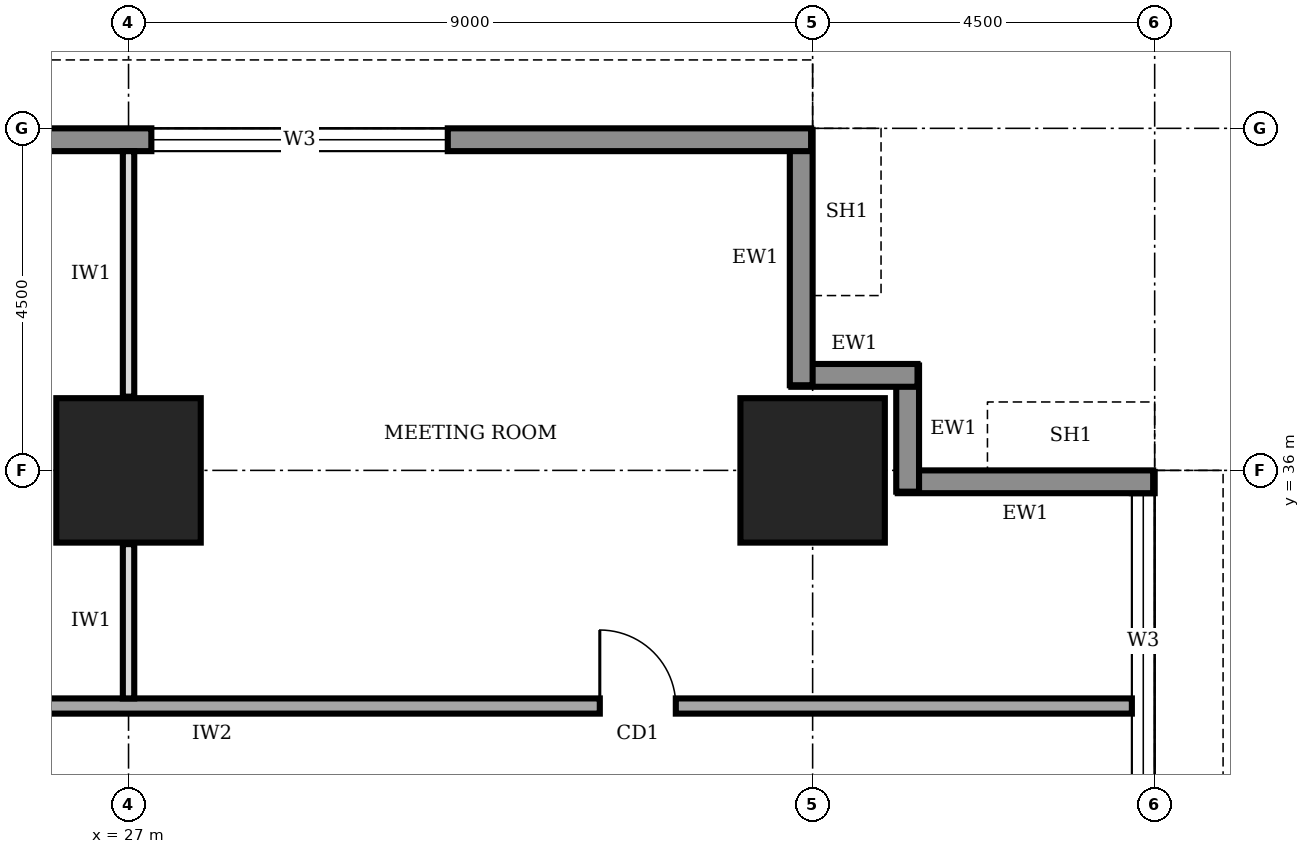
"""IFC4 building model, lengths in metres.
Left out: names, types, materials, properties, quantities, classifications, styles, units other than length and angle.
Written with IfcOpenShell. Run it as: python <this file> out.ifc"""

import sys

from ifc_helpers import new_model, si_unit, direction, frame, frame_2d, origin, origin_2d, place, context, subcontext, project, spatial, rectangle, extrude, element, fill, save


model = new_model("IFC4")
c1 = context("Model", 3, precision=1e-05, world=origin(), true_north=direction((0.0, 1.0)))
c2 = subcontext(c1, "Body", "Model", "MODEL_VIEW")
j1 = project(units=[si_unit("LENGTHUNIT", "METRE"), si_unit("PLANEANGLEUNIT", "RADIAN")], contexts=[c1])
p1 = place(None, origin())
s1 = spatial("IfcSite", under=j1, at=p1, CompositionType="ELEMENT")
p2 = place(p1, origin())
s2 = spatial("IfcBuilding", under=s1, at=p2, CompositionType="ELEMENT")
p3 = place(p2, frame((0.0, 0.0, 85.0)))
s3 = spatial("IfcBuildingStorey", under=s2, at=p3, CompositionType="ELEMENT", Elevation=85.0)
for number, where, z_axis, x_axis in (
    (1, (27.0, 36.0, 0.0), (0.0, 0.0, 1.0), (1.0, 0.0, 0.0)),
    (2, (36.0, 36.0, 0.0), (0.0, 0.0, 1.0), (1.0, 0.0, 0.0)),
):
    element("IfcColumn", number, at=place(p3, frame(where, z_axis=z_axis, x_axis=x_axis)), inside=s3, PredefinedType="COLUMN", context=c2, shape_type="SweptSolid", body=[
        extrude(rectangle(XDim=1.9, YDim=1.9, at=origin_2d()), origin(), (0.0, 0.0, 1.0), 4.0),
    ])
p4 = place(p3, frame((40.35, 4.52, 0.0), z_axis=(0.0, 0.0, 1.0), x_axis=(0.0, 1.0, 0.0)))
e3 = element("IfcWall", 3, at=p4, inside=s3, PredefinedType="STANDARD", context=c2, shape_type="SweptSolid", body=[
    extrude(rectangle(XDim=31.46, YDim=0.3, at=frame_2d((15.73, 0.0))), origin(), (0.0, 0.0, 1.0), 3.75),
])
p5 = place(p4, frame((4.78, 0.0, 0.95)))
e4 = element("IfcOpeningElement", 4, at=p5, cuts=e3, PredefinedType="OPENING", context=c2, shape_type="SweptSolid", body=[
    extrude(rectangle(XDim=3.9, YDim=1.8, at=frame_2d((1.95, 0.9))), frame((0.0, 0.16, 0.0), z_axis=(0.0, -1.0, 0.0), x_axis=(1.0, 0.0, 0.0)), (0.0, 0.0, 1.0), 0.32),
])
p6 = place(p4, frame((9.28, 0.0, 0.95)))
e5 = element("IfcOpeningElement", 5, at=p6, cuts=e3, PredefinedType="OPENING", context=c2, shape_type="SweptSolid", body=[
    extrude(rectangle(XDim=3.9, YDim=1.8, at=frame_2d((1.95, 0.9))), frame((0.0, 0.16, 0.0), z_axis=(0.0, -1.0, 0.0), x_axis=(1.0, 0.0, 0.0)), (0.0, 0.0, 1.0), 0.32),
])
p7 = place(p4, frame((13.78, 0.0, 0.95)))
e6 = element("IfcOpeningElement", 6, at=p7, cuts=e3, PredefinedType="OPENING", context=c2, shape_type="SweptSolid", body=[
    extrude(rectangle(XDim=3.9, YDim=1.8, at=frame_2d((1.95, 0.9))), frame((0.0, 0.16, 0.0), z_axis=(0.0, -1.0, 0.0), x_axis=(1.0, 0.0, 0.0)), (0.0, 0.0, 1.0), 0.32),
])
p8 = place(p4, frame((18.28, 0.0, 0.95)))
e7 = element("IfcOpeningElement", 7, at=p8, cuts=e3, PredefinedType="OPENING", context=c2, shape_type="SweptSolid", body=[
    extrude(rectangle(XDim=3.9, YDim=1.8, at=frame_2d((1.95, 0.9))), frame((0.0, 0.16, 0.0), z_axis=(0.0, -1.0, 0.0), x_axis=(1.0, 0.0, 0.0)), (0.0, 0.0, 1.0), 0.32),
])
p9 = place(p4, frame((22.78, 0.0, 0.95)))
e8 = element("IfcOpeningElement", 8, at=p9, cuts=e3, PredefinedType="OPENING", context=c2, shape_type="SweptSolid", body=[
    extrude(rectangle(XDim=3.9, YDim=1.8, at=frame_2d((1.95, 0.9))), frame((0.0, 0.16, 0.0), z_axis=(0.0, -1.0, 0.0), x_axis=(1.0, 0.0, 0.0)), (0.0, 0.0, 1.0), 0.32),
])
p10 = place(p4, frame((27.28, 0.0, 0.95)))
e9 = element("IfcOpeningElement", 9, at=p10, cuts=e3, PredefinedType="OPENING", context=c2, shape_type="SweptSolid", body=[
    extrude(rectangle(XDim=3.9, YDim=1.8, at=frame_2d((1.95, 0.9))), frame((0.0, 0.16, 0.0), z_axis=(0.0, -1.0, 0.0), x_axis=(1.0, 0.0, 0.0)), (0.0, 0.0, 1.0), 0.32),
])
p11 = place(p3, frame((40.48, 35.85, 0.0), z_axis=(0.0, 0.0, 1.0), x_axis=(-1.0, 0.0, 0.0)))
e10 = element("IfcWall", 10, at=p11, inside=s3, PredefinedType="STANDARD", context=c2, shape_type="SweptSolid", body=[
    extrude(rectangle(XDim=3.36, YDim=0.3, at=frame_2d((1.68, 0.0))), origin(), (0.0, 0.0, 1.0), 2.85),
])
for number, where, z_axis, x_axis in (
    (11, (37.25, 35.72, 0.0), (0.0, 0.0, 1.0), (0.0, 1.0, 0.0)),
    (12, (37.38, 37.25, 0.0), (0.0, 0.0, 1.0), (-1.0, 0.0, 0.0)),
):
    element("IfcWall", number, at=place(p3, frame(where, z_axis=z_axis, x_axis=x_axis)), inside=s3, PredefinedType="STANDARD", context=c2, shape_type="SweptSolid", body=[
        extrude(rectangle(XDim=1.66, YDim=0.3, at=frame_2d((0.83, 0.0))), origin(), (0.0, 0.0, 1.0), 3.75),
    ])
p12 = place(p3, frame((35.85, 37.12, 0.0), z_axis=(0.0, 0.0, 1.0), x_axis=(0.0, 1.0, 0.0)))
e13 = element("IfcWall", 13, at=p12, inside=s3, PredefinedType="STANDARD", context=c2, shape_type="SweptSolid", body=[
    extrude(rectangle(XDim=3.36, YDim=0.3, at=frame_2d((1.68, 0.0))), origin(), (0.0, 0.0, 1.0), 2.85),
])
p13 = place(p3, frame((35.98, 40.35, 0.0), z_axis=(0.0, 0.0, 1.0), x_axis=(-1.0, 0.0, 0.0)))
e14 = element("IfcWall", 14, at=p13, inside=s3, PredefinedType="STANDARD", context=c2, shape_type="SweptSolid", body=[
    extrude(rectangle(XDim=31.46, YDim=0.3, at=frame_2d((15.73, 0.0))), origin(), (0.0, 0.0, 1.0), 3.75),
])
p14 = place(p13, frame((27.28, 0.0, 0.95)))
e15 = element("IfcOpeningElement", 15, at=p14, cuts=e14, PredefinedType="OPENING", context=c2, shape_type="SweptSolid", body=[
    extrude(rectangle(XDim=3.9, YDim=1.8, at=frame_2d((1.95, 0.9))), frame((0.0, 0.16, 0.0), z_axis=(0.0, -1.0, 0.0), x_axis=(1.0, 0.0, 0.0)), (0.0, 0.0, 1.0), 0.32),
])
p15 = place(p13, frame((22.78, 0.0, 0.95)))
e16 = element("IfcOpeningElement", 16, at=p15, cuts=e14, PredefinedType="OPENING", context=c2, shape_type="SweptSolid", body=[
    extrude(rectangle(XDim=3.9, YDim=1.8, at=frame_2d((1.95, 0.9))), frame((0.0, 0.16, 0.0), z_axis=(0.0, -1.0, 0.0), x_axis=(1.0, 0.0, 0.0)), (0.0, 0.0, 1.0), 0.32),
])
p16 = place(p13, frame((4.78, 0.0, 0.95)))
e17 = element("IfcOpeningElement", 17, at=p16, cuts=e14, PredefinedType="OPENING", context=c2, shape_type="SweptSolid", body=[
    extrude(rectangle(XDim=3.9, YDim=1.8, at=frame_2d((1.95, 0.9))), frame((0.0, 0.16, 0.0), z_axis=(0.0, -1.0, 0.0), x_axis=(1.0, 0.0, 0.0)), (0.0, 0.0, 1.0), 0.32),
])
p17 = place(p3, frame((40.2, 32.9, 0.0), z_axis=(0.0, 0.0, 1.0), x_axis=(-1.0, 0.0, 0.0)))
e18 = element("IfcWall", 18, at=p17, inside=s3, PredefinedType="SOLIDWALL", context=c2, shape_type="SweptSolid", body=[
    extrude(rectangle(XDim=28.5, YDim=0.2, at=frame_2d((14.25, 0.0))), origin(), (0.0, 0.0, 1.0), 3.75),
])
p18 = place(p17, frame((27.2, 0.0, 0.0)))
e19 = element("IfcOpeningElement", 19, at=p18, cuts=e18, PredefinedType="OPENING", context=c2, shape_type="SweptSolid", body=[
    extrude(rectangle(XDim=1.0, YDim=2.1, at=frame_2d((0.5, 1.05))), frame((0.0, 0.11, 0.0), z_axis=(0.0, -1.0, 0.0), x_axis=(1.0, 0.0, 0.0)), (0.0, 0.0, 1.0), 0.22),
])
p19 = place(p17, frame((23.95, 0.0, 0.0)))
e20 = element("IfcOpeningElement", 20, at=p19, cuts=e18, PredefinedType="OPENING", context=c2, shape_type="SweptSolid", body=[
    extrude(rectangle(XDim=1.0, YDim=2.1, at=frame_2d((0.5, 1.05))), frame((0.0, 0.11, 0.0), z_axis=(0.0, -1.0, 0.0), x_axis=(1.0, 0.0, 0.0)), (0.0, 0.0, 1.0), 0.22),
])
p20 = place(p17, frame((17.2, 0.0, 0.0)))
e21 = element("IfcOpeningElement", 21, at=p20, cuts=e18, PredefinedType="OPENING", context=c2, shape_type="SweptSolid", body=[
    extrude(rectangle(XDim=1.0, YDim=2.1, at=frame_2d((0.5, 1.05))), frame((0.0, 0.11, 0.0), z_axis=(0.0, -1.0, 0.0), x_axis=(1.0, 0.0, 0.0)), (0.0, 0.0, 1.0), 0.22),
])
p21 = place(p17, frame((6.0, 0.0, 0.0)))
e22 = element("IfcOpeningElement", 22, at=p21, cuts=e18, PredefinedType="OPENING", context=c2, shape_type="SweptSolid", body=[
    extrude(rectangle(XDim=1.0, YDim=2.1, at=frame_2d((0.5, 1.05))), frame((0.0, 0.11, 0.0), z_axis=(0.0, -1.0, 0.0), x_axis=(1.0, 0.0, 0.0)), (0.0, 0.0, 1.0), 0.22),
])
p22 = place(p3, frame((27.0, 33.0, 0.0), z_axis=(0.0, 0.0, 1.0), x_axis=(0.0, 1.0, 0.0)))
e23 = element("IfcWall", 23, at=p22, inside=s3, PredefinedType="PARTITIONING", context=c2, shape_type="SweptSolid", body=[
    extrude(rectangle(XDim=2.03, YDim=0.15, at=frame_2d((1.015, 0.0))), origin(), (0.0, 0.0, 1.0), 2.85),
])
p23 = place(p3, frame((27.0, 36.97, 0.0), z_axis=(0.0, 0.0, 1.0), x_axis=(0.0, 1.0, 0.0)))
e24 = element("IfcWall", 24, at=p23, inside=s3, PredefinedType="PARTITIONING", context=c2, shape_type="SweptSolid", body=[
    extrude(rectangle(XDim=3.23, YDim=0.15, at=frame_2d((1.615, 0.0))), origin(), (0.0, 0.0, 1.0), 2.85),
])
p24 = place(p10, origin())
e25 = element("IfcWindow", 25, at=p24, inside=s3, PartitioningType="SINGLE_PANEL", PredefinedType="WINDOW", context=c2, shape_type="SweptSolid", body=[
    extrude(rectangle(XDim=3.9, YDim=1.8, at=frame_2d((1.95, 0.9))), frame((0.0, 0.03, 0.0), z_axis=(0.0, -1.0, 0.0), x_axis=(1.0, 0.0, 0.0)), (0.0, 0.0, 1.0), 0.06),
])
fill(e9, e25)
p25 = place(p16, origin())
e26 = element("IfcWindow", 26, at=p25, inside=s3, PartitioningType="SINGLE_PANEL", PredefinedType="WINDOW", context=c2, shape_type="SweptSolid", body=[
    extrude(rectangle(XDim=3.9, YDim=1.8, at=frame_2d((1.95, 0.9))), frame((0.0, 0.03, 0.0), z_axis=(0.0, -1.0, 0.0), x_axis=(1.0, 0.0, 0.0)), (0.0, 0.0, 1.0), 0.06),
])
fill(e17, e26)
p26 = place(p21, frame((1.0, 0.0, 0.0), z_axis=(0.0, 0.0, 1.0), x_axis=(-1.0, 0.0, 0.0)))
e27 = element("IfcDoor", 27, at=p26, inside=s3, OperationType="SINGLE_SWING_LEFT", PredefinedType="DOOR", context=c2, shape_type="SweptSolid", body=[
    extrude(rectangle(XDim=1.0, YDim=2.1, at=frame_2d((0.5, 1.05))), frame((0.0, 0.025, 0.0), z_axis=(0.0, -1.0, 0.0), x_axis=(1.0, 0.0, 0.0)), (0.0, 0.0, 1.0), 0.05),
])
fill(e22, e27)
save(model, sys.argv[1])
